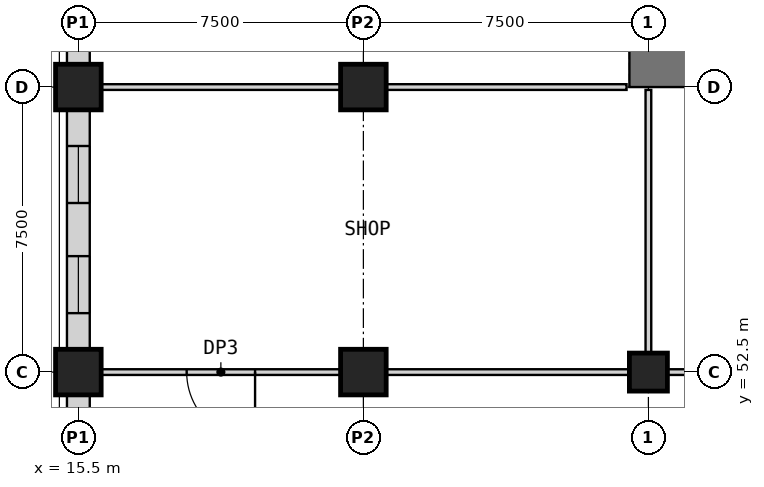
"""IFC4 building model, lengths in metres.
Left out: names, types, materials, properties, quantities, classifications, styles, units other than length and angle.
Written with IfcOpenShell. Run it as: python <this file> out.ifc"""

import sys

from ifc_helpers import new_model, si_unit, direction, frame, frame_2d, origin, origin_2d, place, context, subcontext, project, spatial, rectangle, extrude, element, fill, save


model = new_model("IFC4")
c1 = context("Model", 3, precision=1e-05, world=origin(), true_north=direction((0.0, 1.0)))
c2 = subcontext(c1, "Body", "Model", "MODEL_VIEW")
j1 = project(units=[si_unit("LENGTHUNIT", "METRE"), si_unit("PLANEANGLEUNIT", "RADIAN")], contexts=[c1])
p1 = place(None, origin())
s1 = spatial("IfcSite", under=j1, at=p1, CompositionType="ELEMENT")
p2 = place(p1, origin())
s2 = spatial("IfcBuilding", under=s1, at=p2, CompositionType="ELEMENT")
p3 = place(p2, frame((0.0, 0.0, 13.5)))
s3 = spatial("IfcBuildingStorey", under=s2, at=p3, CompositionType="ELEMENT", Elevation=13.5)
p4 = place(p3, frame((30.5, 52.5, 0.0), z_axis=(0.0, 0.0, 1.0), x_axis=(1.0, 0.0, 0.0)))
e1 = element("IfcColumn", 1, at=p4, inside=s3, PredefinedType="COLUMN", context=c2, shape_type="SweptSolid", body=[
    extrude(rectangle(XDim=1.0, YDim=1.0, at=origin_2d()), origin(), (0.0, 0.0, 1.0), 5.0),
])
for number, where, z_axis, x_axis in (
    (2, (15.5, 52.5, 0.0), (0.0, 0.0, 1.0), (1.0, 0.0, 0.0)),
    (3, (15.5, 60.0, 0.0), (0.0, 0.0, 1.0), (1.0, 0.0, 0.0)),
    (4, (23.0, 52.5, 0.0), (0.0, 0.0, 1.0), (1.0, 0.0, 0.0)),
    (5, (23.0, 60.0, 0.0), (0.0, 0.0, 1.0), (1.0, 0.0, 0.0)),
):
    element("IfcColumn", number, at=place(p3, frame(where, z_axis=z_axis, x_axis=x_axis)), inside=s3, PredefinedType="COLUMN", context=c2, shape_type="SweptSolid", body=[
        extrude(rectangle(XDim=1.2, YDim=1.2, at=origin_2d()), origin(), (0.0, 0.0, 1.0), 5.0),
    ])
p5 = place(p3, frame((30.0, 60.5, 0.0), z_axis=(0.0, 0.0, 1.0), x_axis=(1.0, 0.0, 0.0)))
e6 = element("IfcWall", 6, at=p5, inside=s3, PredefinedType="SHEAR", context=c2, shape_type="SweptSolid", body=[
    extrude(rectangle(XDim=30.0, YDim=1.0, at=frame_2d((15.0, 0.0))), origin(), (0.0, 0.0, 1.0), 5.0),
])
p6 = place(p5, frame((21.9, 0.0, 0.0)))
e7 = element("IfcOpeningElement", 7, at=p6, cuts=e6, PredefinedType="OPENING", context=c2, shape_type="SweptSolid", body=[
    extrude(rectangle(XDim=1.8, YDim=2.1, at=frame_2d((0.9, 1.05))), frame((0.0, 0.51, 0.0), z_axis=(0.0, -1.0, 0.0), x_axis=(1.0, 0.0, 0.0)), (0.0, 0.0, 1.0), 1.02),
])
p7 = place(p5, frame((26.5, 0.0, 0.0)))
e8 = element("IfcOpeningElement", 8, at=p7, cuts=e6, PredefinedType="OPENING", context=c2, shape_type="SweptSolid", body=[
    extrude(rectangle(XDim=1.2, YDim=2.1, at=frame_2d((0.6, 1.05))), frame((0.0, 0.51, 0.0), z_axis=(0.0, -1.0, 0.0), x_axis=(1.0, 0.0, 0.0)), (0.0, 0.0, 1.0), 1.02),
])
p8 = place(p3, frame((22.4, 52.5, 0.0), z_axis=(0.0, 0.0, 1.0), x_axis=(-1.0, 0.0, 0.0)))
e9 = element("IfcWall", 9, at=p8, inside=s3, PredefinedType="PARTITIONING", context=c2, shape_type="SweptSolid", body=[
    extrude(rectangle(XDim=6.3, YDim=0.15, at=frame_2d((3.15, 0.0))), origin(), (0.0, 0.0, 1.0), 4.7),
])
p9 = place(p8, frame((2.25, 0.0, 0.0)))
e10 = element("IfcOpeningElement", 10, at=p9, cuts=e9, PredefinedType="OPENING", context=c2, shape_type="SweptSolid", body=[
    extrude(rectangle(XDim=1.8, YDim=2.4, at=frame_2d((0.9, 1.2))), frame((0.0, 0.085, 0.0), z_axis=(0.0, -1.0, 0.0), x_axis=(1.0, 0.0, 0.0)), (0.0, 0.0, 1.0), 0.17),
])
p10 = place(p3, frame((23.6, 52.5, 0.0), z_axis=(0.0, 0.0, 1.0), x_axis=(1.0, 0.0, 0.0)))
e11 = element("IfcWall", 11, at=p10, inside=s3, PredefinedType="PARTITIONING", context=c2, shape_type="SweptSolid", body=[
    extrude(rectangle(XDim=6.4, YDim=0.15, at=frame_2d((3.2, 0.0))), origin(), (0.0, 0.0, 1.0), 4.7),
])
p11 = place(p3, frame((31.0, 52.5, 0.0), z_axis=(0.0, 0.0, 1.0), x_axis=(1.0, 0.0, 0.0)))
e12 = element("IfcWall", 12, at=p11, inside=s3, PredefinedType="PARTITIONING", context=c2, shape_type="SweptSolid", body=[
    extrude(rectangle(XDim=5.9, YDim=0.15, at=frame_2d((2.95, 0.0))), origin(), (0.0, 0.0, 1.0), 4.7),
])
p12 = place(p3, frame((16.1, 60.0, 0.0), z_axis=(0.0, 0.0, 1.0), x_axis=(1.0, 0.0, 0.0)))
e13 = element("IfcWall", 13, at=p12, inside=s3, PredefinedType="PARTITIONING", context=c2, shape_type="SweptSolid", body=[
    extrude(rectangle(XDim=6.3, YDim=0.15, at=frame_2d((3.15, 0.0))), origin(), (0.0, 0.0, 1.0), 4.7),
])
p13 = place(p3, frame((23.6, 60.0, 0.0), z_axis=(0.0, 0.0, 1.0), x_axis=(1.0, 0.0, 0.0)))
e14 = element("IfcWall", 14, at=p13, inside=s3, PredefinedType="PARTITIONING", context=c2, shape_type="SweptSolid", body=[
    extrude(rectangle(XDim=6.325, YDim=0.15, at=frame_2d((3.163, 0.0))), origin(), (0.0, 0.0, 1.0), 4.7),
])
p14 = place(p3, frame((15.5, 46.1, 0.0), z_axis=(0.0, 0.0, 1.0), x_axis=(0.0, 1.0, 0.0)))
e15 = element("IfcWall", 15, at=p14, inside=s3, PredefinedType="PARTITIONING", context=c2, shape_type="SweptSolid", body=[
    extrude(rectangle(XDim=5.8, YDim=0.6, at=frame_2d((2.9, 0.0))), origin(), (0.0, 0.0, 1.0), 4.1),
])
p15 = place(p14, frame((0.816, 0.0, 0.9)))
e16 = element("IfcOpeningElement", 16, at=p15, cuts=e15, PredefinedType="OPENING", context=c2, shape_type="SweptSolid", body=[
    extrude(rectangle(XDim=1.5, YDim=2.8, at=frame_2d((0.75, 1.4))), frame((0.0, 0.31, 0.0), z_axis=(0.0, -1.0, 0.0), x_axis=(1.0, 0.0, 0.0)), (0.0, 0.0, 1.0), 0.62),
])
p16 = place(p14, frame((3.484, 0.0, 0.9)))
e17 = element("IfcOpeningElement", 17, at=p16, cuts=e15, PredefinedType="OPENING", context=c2, shape_type="SweptSolid", body=[
    extrude(rectangle(XDim=1.5, YDim=2.8, at=frame_2d((0.75, 1.4))), frame((0.0, 0.31, 0.0), z_axis=(0.0, -1.0, 0.0), x_axis=(1.0, 0.0, 0.0)), (0.0, 0.0, 1.0), 0.62),
])
p17 = place(p3, frame((15.5, 53.1, 0.0), z_axis=(0.0, 0.0, 1.0), x_axis=(0.0, 1.0, 0.0)))
e18 = element("IfcWall", 18, at=p17, inside=s3, PredefinedType="PARTITIONING", context=c2, shape_type="SweptSolid", body=[
    extrude(rectangle(XDim=6.3, YDim=0.6, at=frame_2d((3.15, 0.0))), origin(), (0.0, 0.0, 1.0), 4.1),
])
p18 = place(p17, frame((0.951, 0.0, 0.9)))
e19 = element("IfcOpeningElement", 19, at=p18, cuts=e18, PredefinedType="OPENING", context=c2, shape_type="SweptSolid", body=[
    extrude(rectangle(XDim=1.5, YDim=2.8, at=frame_2d((0.75, 1.4))), frame((0.0, 0.31, 0.0), z_axis=(0.0, -1.0, 0.0), x_axis=(1.0, 0.0, 0.0)), (0.0, 0.0, 1.0), 0.62),
])
p19 = place(p17, frame((3.849, 0.0, 0.9)))
e20 = element("IfcOpeningElement", 20, at=p19, cuts=e18, PredefinedType="OPENING", context=c2, shape_type="SweptSolid", body=[
    extrude(rectangle(XDim=1.5, YDim=2.8, at=frame_2d((0.75, 1.4))), frame((0.0, 0.31, 0.0), z_axis=(0.0, -1.0, 0.0), x_axis=(1.0, 0.0, 0.0)), (0.0, 0.0, 1.0), 0.62),
])
p20 = place(p3, frame((15.5, 60.6, 0.0), z_axis=(0.0, 0.0, 1.0), x_axis=(0.0, 1.0, 0.0)))
e21 = element("IfcWall", 21, at=p20, inside=s3, PredefinedType="PARTITIONING", context=c2, shape_type="SweptSolid", body=[
    extrude(rectangle(XDim=6.3, YDim=0.6, at=frame_2d((3.15, 0.0))), origin(), (0.0, 0.0, 1.0), 4.1),
])
p21 = place(p20, frame((0.951, 0.0, 0.9)))
e22 = element("IfcOpeningElement", 22, at=p21, cuts=e21, PredefinedType="OPENING", context=c2, shape_type="SweptSolid", body=[
    extrude(rectangle(XDim=1.5, YDim=2.8, at=frame_2d((0.75, 1.4))), frame((0.0, 0.31, 0.0), z_axis=(0.0, -1.0, 0.0), x_axis=(1.0, 0.0, 0.0)), (0.0, 0.0, 1.0), 0.62),
])
p22 = place(p20, frame((3.849, 0.0, 0.9)))
e23 = element("IfcOpeningElement", 23, at=p22, cuts=e21, PredefinedType="OPENING", context=c2, shape_type="SweptSolid", body=[
    extrude(rectangle(XDim=1.5, YDim=2.8, at=frame_2d((0.75, 1.4))), frame((0.0, 0.31, 0.0), z_axis=(0.0, -1.0, 0.0), x_axis=(1.0, 0.0, 0.0)), (0.0, 0.0, 1.0), 0.62),
])
p23 = place(p3, frame((30.5, 53.0, 0.0), z_axis=(0.0, 0.0, 1.0), x_axis=(0.0, 1.0, 0.0)))
e24 = element("IfcWall", 24, at=p23, inside=s3, PredefinedType="PARTITIONING", context=c2, shape_type="SweptSolid", body=[
    extrude(rectangle(XDim=6.925, YDim=0.15, at=frame_2d((3.462, 0.0))), origin(), (0.0, 0.0, 1.0), 4.7),
])
p24 = place(p9, origin())
e25 = element("IfcDoor", 25, at=p24, inside=s3, OperationType="SINGLE_SWING_LEFT", PredefinedType="DOOR", context=c2, shape_type="SweptSolid", body=[
    extrude(rectangle(XDim=1.8, YDim=2.4, at=frame_2d((0.9, 1.2))), frame((0.0, 0.025, 0.0), z_axis=(0.0, -1.0, 0.0), x_axis=(1.0, 0.0, 0.0)), (0.0, 0.0, 1.0), 0.05),
])
fill(e10, e25)
p25 = place(p18, origin())
e26 = element("IfcWindow", 26, at=p25, inside=s3, PartitioningType="SINGLE_PANEL", PredefinedType="WINDOW", context=c2, shape_type="SweptSolid", body=[
    extrude(rectangle(XDim=1.5, YDim=2.8, at=frame_2d((0.75, 1.4))), frame((0.0, 0.03, 0.0), z_axis=(0.0, -1.0, 0.0), x_axis=(1.0, 0.0, 0.0)), (0.0, 0.0, 1.0), 0.06),
])
fill(e19, e26)
p26 = place(p19, origin())
e27 = element("IfcWindow", 27, at=p26, inside=s3, PartitioningType="SINGLE_PANEL", PredefinedType="WINDOW", context=c2, shape_type="SweptSolid", body=[
    extrude(rectangle(XDim=1.5, YDim=2.8, at=frame_2d((0.75, 1.4))), frame((0.0, 0.03, 0.0), z_axis=(0.0, -1.0, 0.0), x_axis=(1.0, 0.0, 0.0)), (0.0, 0.0, 1.0), 0.06),
])
fill(e20, e27)
save(model, sys.argv[1])
